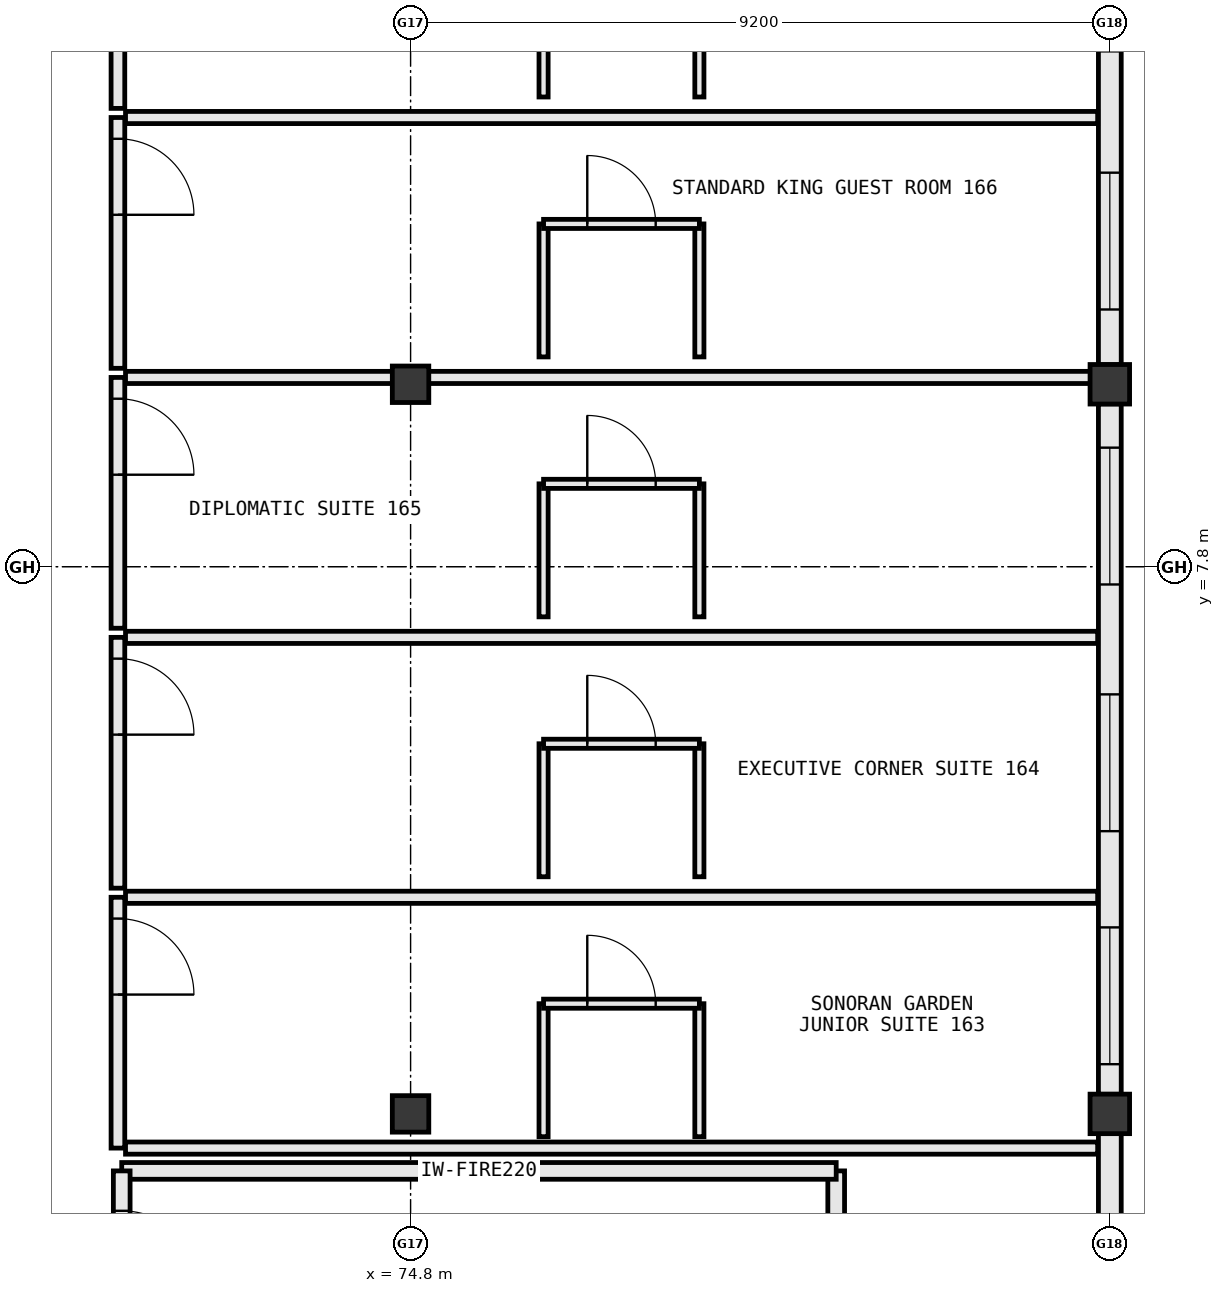
"""IFC4 building model, lengths in metres.
Left out: names, types, materials, properties, quantities, classifications, styles, units other than length and angle.
Written with IfcOpenShell. Run it as: python <this file> out.ifc"""

import sys

from ifc_helpers import new_model, si_unit, direction, frame, frame_2d, origin, origin_2d, place, context, subcontext, project, spatial, rectangle, extrude, element, fill, save


model = new_model("IFC4")
c1 = context("Model", 3, precision=1e-05, world=origin(), true_north=direction((0.0, 1.0)))
c2 = subcontext(c1, "Body", "Model", "MODEL_VIEW")
j1 = project(units=[si_unit("LENGTHUNIT", "METRE"), si_unit("PLANEANGLEUNIT", "RADIAN")], contexts=[c1])
p1 = place(None, origin())
s1 = spatial("IfcSite", under=j1, at=p1, CompositionType="ELEMENT")
p2 = place(p1, origin())
s2 = spatial("IfcBuilding", under=s1, at=p2, CompositionType="ELEMENT")
p3 = place(p2, frame((0.0, 0.0, 23.8)))
s3 = spatial("IfcBuildingStorey", under=s2, at=p3, CompositionType="ELEMENT", Elevation=23.8)
for number, where, z_axis, x_axis in (
    (1, (74.8, 0.6, 0.0), (0.0, 0.0, 1.0), (1.0, 0.0, 0.0)),
    (2, (74.8, 10.2, 0.0), (0.0, 0.0, 1.0), (1.0, 0.0, 0.0)),
):
    element("IfcColumn", number, at=place(p3, frame(where, z_axis=z_axis, x_axis=x_axis)), inside=s3, PredefinedType="COLUMN", context=c2, shape_type="SweptSolid", body=[
        extrude(rectangle(XDim=0.48, YDim=0.48, at=origin_2d()), origin(), (0.0, 0.0, 1.0), 3.8),
    ])
for number, where, z_axis, x_axis in (
    (3, (84.0, 0.6, 0.0), (0.0, 0.0, 1.0), (1.0, 0.0, 0.0)),
    (4, (84.0, 10.2, 0.0), (0.0, 0.0, 1.0), (1.0, 0.0, 0.0)),
):
    element("IfcColumn", number, at=place(p3, frame(where, z_axis=z_axis, x_axis=x_axis)), inside=s3, PredefinedType="COLUMN", context=c2, shape_type="SweptSolid", body=[
        extrude(rectangle(XDim=0.52, YDim=0.52, at=origin_2d()), origin(), (0.0, 0.0, 1.0), 3.8),
    ])
p4 = place(p3, frame((84.0, -8.742, 0.0), z_axis=(0.0, 0.0, 1.0), x_axis=(0.0, 1.0, 0.0)))
e5 = element("IfcWall", 5, at=p4, inside=s3, PredefinedType="STANDARD", context=c2, shape_type="SweptSolid", body=[
    extrude(rectangle(XDim=9.084, YDim=0.3, at=frame_2d((4.542, 0.0))), origin(), (0.0, 0.0, 1.0), 2.965),
])
p5 = place(p3, frame((84.0, 0.858, 0.0), z_axis=(0.0, 0.0, 1.0), x_axis=(0.0, 1.0, 0.0)))
e6 = element("IfcWall", 6, at=p5, inside=s3, PredefinedType="STANDARD", context=c2, shape_type="SweptSolid", body=[
    extrude(rectangle(XDim=9.084, YDim=0.3, at=frame_2d((4.542, 0.0))), origin(), (0.0, 0.0, 1.0), 2.965),
])
p6 = place(p5, frame((0.396, 0.0, 0.85)))
e7 = element("IfcOpeningElement", 7, at=p6, cuts=e6, PredefinedType="OPENING", context=c2, shape_type="SweptSolid", body=[
    extrude(rectangle(XDim=1.8, YDim=1.85, at=frame_2d((0.9, 0.925))), frame((0.0, 0.162, 0.0), z_axis=(0.0, -1.0, 0.0), x_axis=(1.0, 0.0, 0.0)), (0.0, 0.0, 1.0), 0.324),
])
p7 = place(p5, frame((3.462, 0.0, 0.85)))
e8 = element("IfcOpeningElement", 8, at=p7, cuts=e6, PredefinedType="OPENING", context=c2, shape_type="SweptSolid", body=[
    extrude(rectangle(XDim=1.8, YDim=1.85, at=frame_2d((0.9, 0.925))), frame((0.0, 0.162, 0.0), z_axis=(0.0, -1.0, 0.0), x_axis=(1.0, 0.0, 0.0)), (0.0, 0.0, 1.0), 0.324),
])
p8 = place(p5, frame((6.708, 0.0, 0.85)))
e9 = element("IfcOpeningElement", 9, at=p8, cuts=e6, PredefinedType="OPENING", context=c2, shape_type="SweptSolid", body=[
    extrude(rectangle(XDim=1.8, YDim=1.85, at=frame_2d((0.9, 0.925))), frame((0.0, 0.162, 0.0), z_axis=(0.0, -1.0, 0.0), x_axis=(1.0, 0.0, 0.0)), (0.0, 0.0, 1.0), 0.324),
])
p9 = place(p3, frame((84.0, 10.458, 0.0), z_axis=(0.0, 0.0, 1.0), x_axis=(0.0, 1.0, 0.0)))
e10 = element("IfcWall", 10, at=p9, inside=s3, PredefinedType="STANDARD", context=c2, shape_type="SweptSolid", body=[
    extrude(rectangle(XDim=7.884, YDim=0.3, at=frame_2d((3.942, 0.0))), origin(), (0.0, 0.0, 1.0), 2.965),
])
p10 = place(p9, frame((0.726, 0.0, 0.85)))
e11 = element("IfcOpeningElement", 11, at=p10, cuts=e10, PredefinedType="OPENING", context=c2, shape_type="SweptSolid", body=[
    extrude(rectangle(XDim=1.8, YDim=1.85, at=frame_2d((0.9, 0.925))), frame((0.0, 0.162, 0.0), z_axis=(0.0, -1.0, 0.0), x_axis=(1.0, 0.0, 0.0)), (0.0, 0.0, 1.0), 0.324),
])
p11 = place(p9, frame((4.122, 0.0, 0.85)))
e12 = element("IfcOpeningElement", 12, at=p11, cuts=e10, PredefinedType="OPENING", context=c2, shape_type="SweptSolid", body=[
    extrude(rectangle(XDim=1.8, YDim=1.85, at=frame_2d((0.9, 0.925))), frame((0.0, 0.162, 0.0), z_axis=(0.0, -1.0, 0.0), x_axis=(1.0, 0.0, 0.0)), (0.0, 0.0, 1.0), 0.324),
])
p12 = place(p3, frame((80.4, -2.25, 0.0), z_axis=(0.0, 0.0, 1.0), x_axis=(0.0, 1.0, 0.0)))
e13 = element("IfcWall", 13, at=p12, inside=s3, PredefinedType="STANDARD", context=c2, shape_type="SweptSolid", body=[
    extrude(rectangle(XDim=2.1, YDim=0.22, at=frame_2d((1.05, 0.0))), origin(), (0.0, 0.0, 1.0), 3.55),
])
p13 = place(p3, frame((80.4, -0.15, 0.0), z_axis=(0.0, 0.0, 1.0), x_axis=(-1.0, 0.0, 0.0)))
e14 = element("IfcWall", 14, at=p13, inside=s3, PredefinedType="STANDARD", context=c2, shape_type="SweptSolid", body=[
    extrude(rectangle(XDim=9.4, YDim=0.22, at=frame_2d((4.7, 0.0))), origin(), (0.0, 0.0, 1.0), 3.55),
])
p14 = place(p3, frame((71.0, -0.15, 0.0), z_axis=(0.0, 0.0, 1.0), x_axis=(0.0, -1.0, 0.0)))
e15 = element("IfcWall", 15, at=p14, inside=s3, PredefinedType="STANDARD", context=c2, shape_type="SweptSolid", body=[
    extrude(rectangle(XDim=2.1, YDim=0.22, at=frame_2d((1.05, 0.0))), origin(), (0.0, 0.0, 1.0), 3.55),
])
p15 = place(p14, frame((0.525, 0.0, 0.0)))
e16 = element("IfcOpeningElement", 16, at=p15, cuts=e15, PredefinedType="OPENING", context=c2, shape_type="SweptSolid", body=[
    extrude(rectangle(XDim=1.05, YDim=2.2, at=frame_2d((0.525, 1.1))), frame((0.0, 0.122, 0.0), z_axis=(0.0, -1.0, 0.0), x_axis=(1.0, 0.0, 0.0)), (0.0, 0.0, 1.0), 0.244),
])
p16 = place(p3, frame((70.95, 3.45, 0.0), z_axis=(0.0, 0.0, 1.0), x_axis=(0.0, -1.0, 0.0)))
e17 = element("IfcWall", 17, at=p16, inside=s3, PredefinedType="PARTITIONING", context=c2, shape_type="SweptSolid", body=[
    extrude(rectangle(XDim=3.3, YDim=0.18, at=frame_2d((1.65, 0.0))), origin(), (0.0, 0.0, 1.0), 3.55),
])
p17 = place(p16, frame((0.28, 0.0, 0.0)))
e18 = element("IfcOpeningElement", 18, at=p17, cuts=e17, PredefinedType="OPENING", context=c2, shape_type="SweptSolid", body=[
    extrude(rectangle(XDim=1.0, YDim=2.2, at=frame_2d((0.5, 1.1))), frame((0.0, 0.102, 0.0), z_axis=(0.0, -1.0, 0.0), x_axis=(1.0, 0.0, 0.0)), (0.0, 0.0, 1.0), 0.204),
])
for number, where, z_axis, x_axis in (
    (19, (71.05, 0.15, 0.0), (0.0, 0.0, 1.0), (1.0, 0.0, 0.0)),
    (20, (71.05, 3.45, 0.0), (0.0, 0.0, 1.0), (1.0, 0.0, 0.0)),
):
    element("IfcWall", number, at=place(p3, frame(where, z_axis=z_axis, x_axis=x_axis)), inside=s3, PredefinedType="PARTITIONING", context=c2, shape_type="SweptSolid", body=[
        extrude(rectangle(XDim=12.79, YDim=0.16, at=frame_2d((6.395, 0.0))), origin(), (0.0, 0.0, 1.0), 3.55),
    ])
for number, where, z_axis, x_axis in (
    (21, (76.55, 0.3, 0.0), (0.0, 0.0, 1.0), (0.0, 1.0, 0.0)),
    (22, (78.6, 0.3, 0.0), (0.0, 0.0, 1.0), (0.0, 1.0, 0.0)),
):
    element("IfcWall", number, at=place(p3, frame(where, z_axis=z_axis, x_axis=x_axis)), inside=s3, PredefinedType="PARTITIONING", context=c2, shape_type="SweptSolid", body=[
        extrude(rectangle(XDim=1.75, YDim=0.12, at=frame_2d((0.875, 0.0))), origin(), (0.0, 0.0, 1.0), 3.55),
    ])
p18 = place(p3, frame((76.55, 2.05, 0.0), z_axis=(0.0, 0.0, 1.0), x_axis=(1.0, 0.0, 0.0)))
e23 = element("IfcWall", 23, at=p18, inside=s3, PredefinedType="PARTITIONING", context=c2, shape_type="SweptSolid", body=[
    extrude(rectangle(XDim=2.05, YDim=0.12, at=frame_2d((1.025, 0.0))), origin(), (0.0, 0.0, 1.0), 3.55),
])
p19 = place(p18, frame((0.575, 0.0, 0.0)))
e24 = element("IfcOpeningElement", 24, at=p19, cuts=e23, PredefinedType="OPENING", context=c2, shape_type="SweptSolid", body=[
    extrude(rectangle(XDim=0.9, YDim=2.15, at=frame_2d((0.45, 1.075))), frame((0.0, 0.072, 0.0), z_axis=(0.0, -1.0, 0.0), x_axis=(1.0, 0.0, 0.0)), (0.0, 0.0, 1.0), 0.144),
])
p20 = place(p3, frame((70.95, 6.87, 0.0), z_axis=(0.0, 0.0, 1.0), x_axis=(0.0, -1.0, 0.0)))
e25 = element("IfcWall", 25, at=p20, inside=s3, PredefinedType="PARTITIONING", context=c2, shape_type="SweptSolid", body=[
    extrude(rectangle(XDim=3.3, YDim=0.18, at=frame_2d((1.65, 0.0))), origin(), (0.0, 0.0, 1.0), 3.55),
])
p21 = place(p20, frame((0.28, 0.0, 0.0)))
e26 = element("IfcOpeningElement", 26, at=p21, cuts=e25, PredefinedType="OPENING", context=c2, shape_type="SweptSolid", body=[
    extrude(rectangle(XDim=1.0, YDim=2.2, at=frame_2d((0.5, 1.1))), frame((0.0, 0.102, 0.0), z_axis=(0.0, -1.0, 0.0), x_axis=(1.0, 0.0, 0.0)), (0.0, 0.0, 1.0), 0.204),
])
p22 = place(p3, frame((71.05, 6.87, 0.0), z_axis=(0.0, 0.0, 1.0), x_axis=(1.0, 0.0, 0.0)))
e27 = element("IfcWall", 27, at=p22, inside=s3, PredefinedType="PARTITIONING", context=c2, shape_type="SweptSolid", body=[
    extrude(rectangle(XDim=12.79, YDim=0.16, at=frame_2d((6.395, 0.0))), origin(), (0.0, 0.0, 1.0), 3.55),
])
for number, where, z_axis, x_axis in (
    (28, (76.55, 3.72, 0.0), (0.0, 0.0, 1.0), (0.0, 1.0, 0.0)),
    (29, (78.6, 3.72, 0.0), (0.0, 0.0, 1.0), (0.0, 1.0, 0.0)),
):
    element("IfcWall", number, at=place(p3, frame(where, z_axis=z_axis, x_axis=x_axis)), inside=s3, PredefinedType="PARTITIONING", context=c2, shape_type="SweptSolid", body=[
        extrude(rectangle(XDim=1.75, YDim=0.12, at=frame_2d((0.875, 0.0))), origin(), (0.0, 0.0, 1.0), 3.55),
    ])
p23 = place(p3, frame((76.55, 5.47, 0.0), z_axis=(0.0, 0.0, 1.0), x_axis=(1.0, 0.0, 0.0)))
e30 = element("IfcWall", 30, at=p23, inside=s3, PredefinedType="PARTITIONING", context=c2, shape_type="SweptSolid", body=[
    extrude(rectangle(XDim=2.05, YDim=0.12, at=frame_2d((1.025, 0.0))), origin(), (0.0, 0.0, 1.0), 3.55),
])
p24 = place(p23, frame((0.575, 0.0, 0.0)))
e31 = element("IfcOpeningElement", 31, at=p24, cuts=e30, PredefinedType="OPENING", context=c2, shape_type="SweptSolid", body=[
    extrude(rectangle(XDim=0.9, YDim=2.15, at=frame_2d((0.45, 1.075))), frame((0.0, 0.072, 0.0), z_axis=(0.0, -1.0, 0.0), x_axis=(1.0, 0.0, 0.0)), (0.0, 0.0, 1.0), 0.144),
])
p25 = place(p3, frame((70.95, 10.29, 0.0), z_axis=(0.0, 0.0, 1.0), x_axis=(0.0, -1.0, 0.0)))
e32 = element("IfcWall", 32, at=p25, inside=s3, PredefinedType="PARTITIONING", context=c2, shape_type="SweptSolid", body=[
    extrude(rectangle(XDim=3.3, YDim=0.18, at=frame_2d((1.65, 0.0))), origin(), (0.0, 0.0, 1.0), 3.55),
])
p26 = place(p25, frame((0.28, 0.0, 0.0)))
e33 = element("IfcOpeningElement", 33, at=p26, cuts=e32, PredefinedType="OPENING", context=c2, shape_type="SweptSolid", body=[
    extrude(rectangle(XDim=1.0, YDim=2.2, at=frame_2d((0.5, 1.1))), frame((0.0, 0.102, 0.0), z_axis=(0.0, -1.0, 0.0), x_axis=(1.0, 0.0, 0.0)), (0.0, 0.0, 1.0), 0.204),
])
p27 = place(p3, frame((71.05, 10.29, 0.0), z_axis=(0.0, 0.0, 1.0), x_axis=(1.0, 0.0, 0.0)))
e34 = element("IfcWall", 34, at=p27, inside=s3, PredefinedType="PARTITIONING", context=c2, shape_type="SweptSolid", body=[
    extrude(rectangle(XDim=12.79, YDim=0.16, at=frame_2d((6.395, 0.0))), origin(), (0.0, 0.0, 1.0), 2.905),
])
for number, where, z_axis, x_axis in (
    (35, (76.55, 7.14, 0.0), (0.0, 0.0, 1.0), (0.0, 1.0, 0.0)),
    (36, (78.6, 7.14, 0.0), (0.0, 0.0, 1.0), (0.0, 1.0, 0.0)),
):
    element("IfcWall", number, at=place(p3, frame(where, z_axis=z_axis, x_axis=x_axis)), inside=s3, PredefinedType="PARTITIONING", context=c2, shape_type="SweptSolid", body=[
        extrude(rectangle(XDim=1.75, YDim=0.12, at=frame_2d((0.875, 0.0))), origin(), (0.0, 0.0, 1.0), 3.55),
    ])
p28 = place(p3, frame((76.55, 8.89, 0.0), z_axis=(0.0, 0.0, 1.0), x_axis=(1.0, 0.0, 0.0)))
e37 = element("IfcWall", 37, at=p28, inside=s3, PredefinedType="PARTITIONING", context=c2, shape_type="SweptSolid", body=[
    extrude(rectangle(XDim=2.05, YDim=0.12, at=frame_2d((1.025, 0.0))), origin(), (0.0, 0.0, 1.0), 3.55),
])
p29 = place(p28, frame((0.575, 0.0, 0.0)))
e38 = element("IfcOpeningElement", 38, at=p29, cuts=e37, PredefinedType="OPENING", context=c2, shape_type="SweptSolid", body=[
    extrude(rectangle(XDim=0.9, YDim=2.15, at=frame_2d((0.45, 1.075))), frame((0.0, 0.072, 0.0), z_axis=(0.0, -1.0, 0.0), x_axis=(1.0, 0.0, 0.0)), (0.0, 0.0, 1.0), 0.144),
])
p30 = place(p3, frame((70.95, 13.71, 0.0), z_axis=(0.0, 0.0, 1.0), x_axis=(0.0, -1.0, 0.0)))
e39 = element("IfcWall", 39, at=p30, inside=s3, PredefinedType="PARTITIONING", context=c2, shape_type="SweptSolid", body=[
    extrude(rectangle(XDim=3.3, YDim=0.18, at=frame_2d((1.65, 0.0))), origin(), (0.0, 0.0, 1.0), 3.55),
])
p31 = place(p30, frame((0.28, 0.0, 0.0)))
e40 = element("IfcOpeningElement", 40, at=p31, cuts=e39, PredefinedType="OPENING", context=c2, shape_type="SweptSolid", body=[
    extrude(rectangle(XDim=1.0, YDim=2.2, at=frame_2d((0.5, 1.1))), frame((0.0, 0.102, 0.0), z_axis=(0.0, -1.0, 0.0), x_axis=(1.0, 0.0, 0.0)), (0.0, 0.0, 1.0), 0.204),
])
p32 = place(p3, frame((71.05, 13.71, 0.0), z_axis=(0.0, 0.0, 1.0), x_axis=(1.0, 0.0, 0.0)))
e41 = element("IfcWall", 41, at=p32, inside=s3, PredefinedType="PARTITIONING", context=c2, shape_type="SweptSolid", body=[
    extrude(rectangle(XDim=12.79, YDim=0.16, at=frame_2d((6.395, 0.0))), origin(), (0.0, 0.0, 1.0), 3.55),
])
for number, where, z_axis, x_axis in (
    (42, (76.55, 10.56, 0.0), (0.0, 0.0, 1.0), (0.0, 1.0, 0.0)),
    (43, (78.6, 10.56, 0.0), (0.0, 0.0, 1.0), (0.0, 1.0, 0.0)),
):
    element("IfcWall", number, at=place(p3, frame(where, z_axis=z_axis, x_axis=x_axis)), inside=s3, PredefinedType="PARTITIONING", context=c2, shape_type="SweptSolid", body=[
        extrude(rectangle(XDim=1.75, YDim=0.12, at=frame_2d((0.875, 0.0))), origin(), (0.0, 0.0, 1.0), 3.55),
    ])
p33 = place(p3, frame((76.55, 12.31, 0.0), z_axis=(0.0, 0.0, 1.0), x_axis=(1.0, 0.0, 0.0)))
e44 = element("IfcWall", 44, at=p33, inside=s3, PredefinedType="PARTITIONING", context=c2, shape_type="SweptSolid", body=[
    extrude(rectangle(XDim=2.05, YDim=0.12, at=frame_2d((1.025, 0.0))), origin(), (0.0, 0.0, 1.0), 3.55),
])
p34 = place(p33, frame((0.575, 0.0, 0.0)))
e45 = element("IfcOpeningElement", 45, at=p34, cuts=e44, PredefinedType="OPENING", context=c2, shape_type="SweptSolid", body=[
    extrude(rectangle(XDim=0.9, YDim=2.15, at=frame_2d((0.45, 1.075))), frame((0.0, 0.072, 0.0), z_axis=(0.0, -1.0, 0.0), x_axis=(1.0, 0.0, 0.0)), (0.0, 0.0, 1.0), 0.144),
])
p35 = place(p3, frame((70.95, 17.13, 0.0), z_axis=(0.0, 0.0, 1.0), x_axis=(0.0, -1.0, 0.0)))
e46 = element("IfcWall", 46, at=p35, inside=s3, PredefinedType="PARTITIONING", context=c2, shape_type="SweptSolid", body=[
    extrude(rectangle(XDim=3.3, YDim=0.18, at=frame_2d((1.65, 0.0))), origin(), (0.0, 0.0, 1.0), 3.55),
])
p36 = place(p35, frame((0.28, 0.0, 0.0)))
e47 = element("IfcOpeningElement", 47, at=p36, cuts=e46, PredefinedType="OPENING", context=c2, shape_type="SweptSolid", body=[
    extrude(rectangle(XDim=1.0, YDim=2.2, at=frame_2d((0.5, 1.1))), frame((0.0, 0.102, 0.0), z_axis=(0.0, -1.0, 0.0), x_axis=(1.0, 0.0, 0.0)), (0.0, 0.0, 1.0), 0.204),
])
for number, where, z_axis, x_axis in (
    (48, (76.55, 13.98, 0.0), (0.0, 0.0, 1.0), (0.0, 1.0, 0.0)),
    (49, (78.6, 13.98, 0.0), (0.0, 0.0, 1.0), (0.0, 1.0, 0.0)),
):
    element("IfcWall", number, at=place(p3, frame(where, z_axis=z_axis, x_axis=x_axis)), inside=s3, PredefinedType="PARTITIONING", context=c2, shape_type="SweptSolid", body=[
        extrude(rectangle(XDim=1.75, YDim=0.12, at=frame_2d((0.875, 0.0))), origin(), (0.0, 0.0, 1.0), 3.55),
    ])
p37 = place(p6, origin())
e50 = element("IfcWindow", 50, at=p37, inside=s3, PartitioningType="SINGLE_PANEL", PredefinedType="WINDOW", context=c2, shape_type="SweptSolid", body=[
    extrude(rectangle(XDim=1.8, YDim=1.85, at=frame_2d((0.9, 0.925))), frame((0.0, 0.03, 0.0), z_axis=(0.0, -1.0, 0.0), x_axis=(1.0, 0.0, 0.0)), (0.0, 0.0, 1.0), 0.06),
])
fill(e7, e50)
p38 = place(p7, origin())
e51 = element("IfcWindow", 51, at=p38, inside=s3, PartitioningType="SINGLE_PANEL", PredefinedType="WINDOW", context=c2, shape_type="SweptSolid", body=[
    extrude(rectangle(XDim=1.8, YDim=1.85, at=frame_2d((0.9, 0.925))), frame((0.0, 0.03, 0.0), z_axis=(0.0, -1.0, 0.0), x_axis=(1.0, 0.0, 0.0)), (0.0, 0.0, 1.0), 0.06),
])
fill(e8, e51)
p39 = place(p8, origin())
e52 = element("IfcWindow", 52, at=p39, inside=s3, PartitioningType="SINGLE_PANEL", PredefinedType="WINDOW", context=c2, shape_type="SweptSolid", body=[
    extrude(rectangle(XDim=1.8, YDim=1.85, at=frame_2d((0.9, 0.925))), frame((0.0, 0.03, 0.0), z_axis=(0.0, -1.0, 0.0), x_axis=(1.0, 0.0, 0.0)), (0.0, 0.0, 1.0), 0.06),
])
fill(e9, e52)
p40 = place(p10, origin())
e53 = element("IfcWindow", 53, at=p40, inside=s3, PartitioningType="SINGLE_PANEL", PredefinedType="WINDOW", context=c2, shape_type="SweptSolid", body=[
    extrude(rectangle(XDim=1.8, YDim=1.85, at=frame_2d((0.9, 0.925))), frame((0.0, 0.03, 0.0), z_axis=(0.0, -1.0, 0.0), x_axis=(1.0, 0.0, 0.0)), (0.0, 0.0, 1.0), 0.06),
])
fill(e11, e53)
p41 = place(p15, origin())
e54 = element("IfcDoor", 54, at=p41, inside=s3, OperationType="SINGLE_SWING_RIGHT", PredefinedType="DOOR", context=c2, shape_type="SweptSolid", body=[
    extrude(rectangle(XDim=1.05, YDim=2.2, at=frame_2d((0.525, 1.1))), frame((0.0, 0.025, 0.0), z_axis=(0.0, -1.0, 0.0), x_axis=(1.0, 0.0, 0.0)), (0.0, 0.0, 1.0), 0.05),
])
fill(e16, e54)
p42 = place(p17, origin())
e55 = element("IfcDoor", 55, at=p42, inside=s3, OperationType="SINGLE_SWING_RIGHT", PredefinedType="DOOR", context=c2, shape_type="SweptSolid", body=[
    extrude(rectangle(XDim=1.0, YDim=2.2, at=frame_2d((0.5, 1.1))), frame((0.0, 0.025, 0.0), z_axis=(0.0, -1.0, 0.0), x_axis=(1.0, 0.0, 0.0)), (0.0, 0.0, 1.0), 0.05),
])
fill(e18, e55)
p43 = place(p19, origin())
e56 = element("IfcDoor", 56, at=p43, inside=s3, OperationType="SINGLE_SWING_LEFT", PredefinedType="DOOR", context=c2, shape_type="SweptSolid", body=[
    extrude(rectangle(XDim=0.9, YDim=2.15, at=frame_2d((0.45, 1.075))), frame((0.0, 0.025, 0.0), z_axis=(0.0, -1.0, 0.0), x_axis=(1.0, 0.0, 0.0)), (0.0, 0.0, 1.0), 0.05),
])
fill(e24, e56)
p44 = place(p21, origin())
e57 = element("IfcDoor", 57, at=p44, inside=s3, OperationType="SINGLE_SWING_RIGHT", PredefinedType="DOOR", context=c2, shape_type="SweptSolid", body=[
    extrude(rectangle(XDim=1.0, YDim=2.2, at=frame_2d((0.5, 1.1))), frame((0.0, 0.025, 0.0), z_axis=(0.0, -1.0, 0.0), x_axis=(1.0, 0.0, 0.0)), (0.0, 0.0, 1.0), 0.05),
])
fill(e26, e57)
p45 = place(p24, origin())
e58 = element("IfcDoor", 58, at=p45, inside=s3, OperationType="SINGLE_SWING_LEFT", PredefinedType="DOOR", context=c2, shape_type="SweptSolid", body=[
    extrude(rectangle(XDim=0.9, YDim=2.15, at=frame_2d((0.45, 1.075))), frame((0.0, 0.025, 0.0), z_axis=(0.0, -1.0, 0.0), x_axis=(1.0, 0.0, 0.0)), (0.0, 0.0, 1.0), 0.05),
])
fill(e31, e58)
p46 = place(p26, origin())
e59 = element("IfcDoor", 59, at=p46, inside=s3, OperationType="SINGLE_SWING_RIGHT", PredefinedType="DOOR", context=c2, shape_type="SweptSolid", body=[
    extrude(rectangle(XDim=1.0, YDim=2.2, at=frame_2d((0.5, 1.1))), frame((0.0, 0.025, 0.0), z_axis=(0.0, -1.0, 0.0), x_axis=(1.0, 0.0, 0.0)), (0.0, 0.0, 1.0), 0.05),
])
fill(e33, e59)
p47 = place(p29, origin())
e60 = element("IfcDoor", 60, at=p47, inside=s3, OperationType="SINGLE_SWING_LEFT", PredefinedType="DOOR", context=c2, shape_type="SweptSolid", body=[
    extrude(rectangle(XDim=0.9, YDim=2.15, at=frame_2d((0.45, 1.075))), frame((0.0, 0.025, 0.0), z_axis=(0.0, -1.0, 0.0), x_axis=(1.0, 0.0, 0.0)), (0.0, 0.0, 1.0), 0.05),
])
fill(e38, e60)
p48 = place(p31, origin())
e61 = element("IfcDoor", 61, at=p48, inside=s3, OperationType="SINGLE_SWING_RIGHT", PredefinedType="DOOR", context=c2, shape_type="SweptSolid", body=[
    extrude(rectangle(XDim=1.0, YDim=2.2, at=frame_2d((0.5, 1.1))), frame((0.0, 0.025, 0.0), z_axis=(0.0, -1.0, 0.0), x_axis=(1.0, 0.0, 0.0)), (0.0, 0.0, 1.0), 0.05),
])
fill(e40, e61)
p49 = place(p34, origin())
e62 = element("IfcDoor", 62, at=p49, inside=s3, OperationType="SINGLE_SWING_LEFT", PredefinedType="DOOR", context=c2, shape_type="SweptSolid", body=[
    extrude(rectangle(XDim=0.9, YDim=2.15, at=frame_2d((0.45, 1.075))), frame((0.0, 0.025, 0.0), z_axis=(0.0, -1.0, 0.0), x_axis=(1.0, 0.0, 0.0)), (0.0, 0.0, 1.0), 0.05),
])
fill(e45, e62)
save(model, sys.argv[1])
